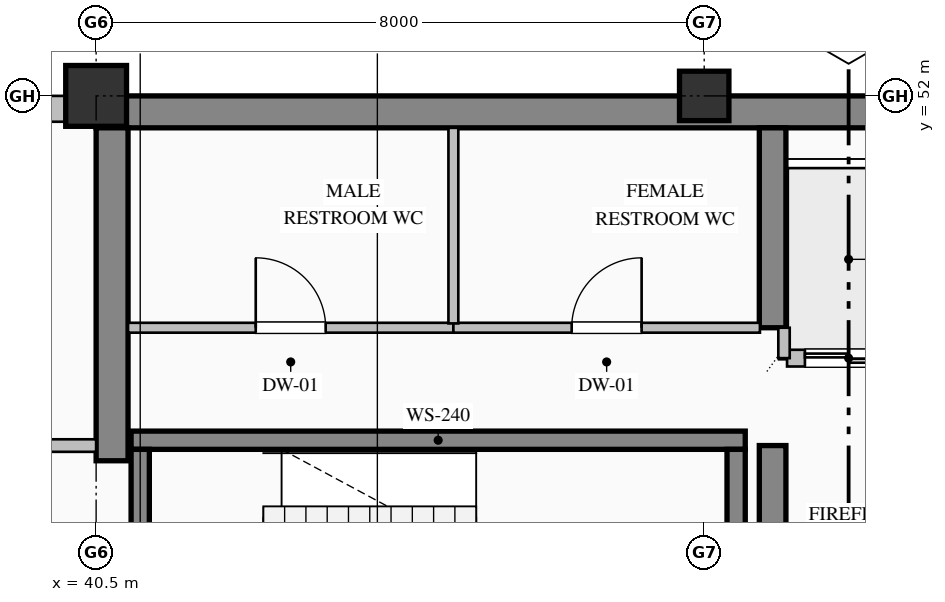
"""IFC4 building model, lengths in metres.
Left out: names, types, materials, properties, quantities, classifications, styles, units other than length and angle.
Written with IfcOpenShell. Run it as: python <this file> out.ifc"""

import sys

from ifc_helpers import new_model, si_unit, direction, frame, frame_2d, origin, origin_2d, place, context, subcontext, project, spatial, rectangle, hollow_rectangle, extrude, element, fill, save


model = new_model("IFC4")
c1 = context("Model", 3, precision=1e-05, world=origin(), true_north=direction((0.0, 1.0)))
c2 = subcontext(c1, "Body", "Model", "MODEL_VIEW")
j1 = project(units=[si_unit("LENGTHUNIT", "METRE"), si_unit("PLANEANGLEUNIT", "RADIAN")], contexts=[c1])
p1 = place(None, origin())
s1 = spatial("IfcSite", under=j1, at=p1, CompositionType="ELEMENT")
p2 = place(p1, origin())
s2 = spatial("IfcBuilding", under=s1, at=p2, CompositionType="ELEMENT")
p3 = place(p2, frame((0.0, 0.0, 347.2)))
s3 = spatial("IfcBuildingStorey", under=s2, at=p3, CompositionType="ELEMENT", Elevation=347.2)
p4 = place(p3, frame((40.5, 51.79, 0.0), z_axis=(0.0, 0.0, 1.0), x_axis=(1.0, 0.0, 0.0)))
e1 = element("IfcWall", 1, at=p4, inside=s3, PredefinedType="SHEAR", context=c2, shape_type="SweptSolid", body=[
    extrude(rectangle(XDim=23.5, YDim=0.42, at=frame_2d((11.75, 0.0))), origin(), (0.0, 0.0, 1.0), 3.785),
])
p5 = place(p3, frame((40.71, 47.2, 0.0), z_axis=(0.0, 0.0, 1.0), x_axis=(0.0, 1.0, 0.0)))
e2 = element("IfcWall", 2, at=p5, inside=s3, PredefinedType="SHEAR", context=c2, shape_type="SweptSolid", body=[
    extrude(rectangle(XDim=4.38, YDim=0.42, at=frame_2d((2.19, 0.0))), origin(), (0.0, 0.0, 1.0), 3.785),
])
p6 = place(p3, frame((49.4, 44.4, 0.0), z_axis=(0.0, 0.0, 1.0), x_axis=(0.0, 1.0, 0.0)))
e3 = element("IfcWall", 3, at=p6, inside=s3, PredefinedType="SHEAR", context=c2, shape_type="SweptSolid", body=[
    extrude(rectangle(XDim=3.0, YDim=0.35, at=frame_2d((1.5, 0.0))), origin(), (0.0, 0.0, 1.0), 3.785),
])
p7 = place(p3, frame((49.4, 48.95, 0.0), z_axis=(0.0, 0.0, 1.0), x_axis=(0.0, 1.0, 0.0)))
e4 = element("IfcWall", 4, at=p7, inside=s3, PredefinedType="SHEAR", context=c2, shape_type="SweptSolid", body=[
    extrude(rectangle(XDim=2.63, YDim=0.35, at=frame_2d((1.315, 0.0))), origin(), (0.0, 0.0, 1.0), 3.785),
])
p8 = place(p3, frame((40.5, 52.0, 0.0), z_axis=(0.0, 0.0, 1.0), x_axis=(1.0, 0.0, 0.0)))
e5 = element("IfcColumn", 5, at=p8, inside=s3, PredefinedType="COLUMN", context=c2, shape_type="SweptSolid", body=[
    extrude(hollow_rectangle(XDim=0.8, YDim=0.8, WallThickness=0.032, at=origin_2d()), origin(), (0.0, 0.0, 1.0), 4.0),
])
p9 = place(p3, frame((48.5, 52.0, 0.0), z_axis=(0.0, 0.0, 1.0), x_axis=(1.0, 0.0, 0.0)))
e6 = element("IfcColumn", 6, at=p9, inside=s3, PredefinedType="COLUMN", context=c2, shape_type="SweptSolid", body=[
    extrude(hollow_rectangle(XDim=0.65, YDim=0.65, WallThickness=0.028, at=origin_2d()), origin(), (0.0, 0.0, 1.0), 4.0),
])
p10 = place(p3, frame((20.5, 51.83, 0.0), z_axis=(0.0, 0.0, 1.0), x_axis=(1.0, 0.0, 0.0)))
e7 = element("IfcWall", 7, at=p10, inside=s3, PredefinedType="SOLIDWALL", context=c2, shape_type="SweptSolid", body=[
    extrude(rectangle(XDim=20.02, YDim=0.34, at=frame_2d((10.01, 0.0))), origin(), (0.0, 0.0, 1.0), 3.335),
])
p11 = place(p3, frame((40.96, 47.47, 0.0), z_axis=(0.0, 0.0, 1.0), x_axis=(1.0, 0.0, 0.0)))
e8 = element("IfcWall", 8, at=p11, inside=s3, PredefinedType="SOLIDWALL", context=c2, shape_type="SweptSolid", body=[
    extrude(rectangle(XDim=8.08, YDim=0.24, at=frame_2d((4.04, 0.0))), origin(), (0.0, 0.0, 1.0), 4.0),
])
p12 = place(p3, frame((41.08, 47.35, 0.0), z_axis=(0.0, 0.0, 1.0), x_axis=(0.0, -1.0, 0.0)))
e9 = element("IfcWall", 9, at=p12, inside=s3, PredefinedType="SOLIDWALL", context=c2, shape_type="SweptSolid", body=[
    extrude(rectangle(XDim=3.15, YDim=0.24, at=frame_2d((1.575, 0.0))), origin(), (0.0, 0.0, 1.0), 4.0),
])
p13 = place(p12, frame((1.0, 0.0, 0.0)))
e10 = element("IfcOpeningElement", 10, at=p13, cuts=e9, PredefinedType="OPENING", context=c2, shape_type="SweptSolid", body=[
    extrude(rectangle(XDim=1.15, YDim=2.2, at=frame_2d((0.575, 1.1))), frame((0.0, 0.13, 0.0), z_axis=(0.0, -1.0, 0.0), x_axis=(1.0, 0.0, 0.0)), (0.0, 0.0, 1.0), 0.26),
])
p14 = place(p3, frame((48.92, 44.2, 0.0), z_axis=(0.0, 0.0, 1.0), x_axis=(0.0, 1.0, 0.0)))
e11 = element("IfcWall", 11, at=p14, inside=s3, PredefinedType="SOLIDWALL", context=c2, shape_type="SweptSolid", body=[
    extrude(rectangle(XDim=3.15, YDim=0.24, at=frame_2d((1.575, 0.0))), origin(), (0.0, 0.0, 1.0), 4.0),
])
p15 = place(p3, frame((54.71, 48.55, 0.0), z_axis=(0.0, 0.0, 1.0), x_axis=(-1.0, 0.0, 0.0)))
e12 = element("IfcWall", 12, at=p15, inside=s3, PredefinedType="PARTITIONING", context=c2, shape_type="SweptSolid", body=[
    extrude(rectangle(XDim=5.12, YDim=0.22, at=frame_2d((2.56, 0.0))), origin(), (0.0, 0.0, 1.0), 3.785),
])
p16 = place(p15, frame((3.735, 0.0, 0.0)))
e13 = element("IfcOpeningElement", 13, at=p16, cuts=e12, PredefinedType="OPENING", context=c2, shape_type="SweptSolid", body=[
    extrude(rectangle(XDim=1.15, YDim=2.2, at=frame_2d((0.575, 1.1))), frame((0.0, 0.12, 0.0), z_axis=(0.0, -1.0, 0.0), x_axis=(1.0, 0.0, 0.0)), (0.0, 0.0, 1.0), 0.24),
])
p17 = place(p15, frame((0.935, 0.0, 0.0)))
e14 = element("IfcOpeningElement", 14, at=p17, cuts=e12, PredefinedType="OPENING", context=c2, shape_type="SweptSolid", body=[
    extrude(rectangle(XDim=1.15, YDim=2.2, at=frame_2d((0.575, 1.1))), frame((0.0, 0.12, 0.0), z_axis=(0.0, -1.0, 0.0), x_axis=(1.0, 0.0, 0.0)), (0.0, 0.0, 1.0), 0.24),
])
p18 = place(p3, frame((49.55, 48.55, 0.0), z_axis=(0.0, 0.0, 1.0), x_axis=(0.0, 1.0, 0.0)))
e15 = element("IfcWall", 15, at=p18, inside=s3, PredefinedType="PARTITIONING", context=c2, shape_type="SweptSolid", body=[
    extrude(rectangle(XDim=0.4, YDim=0.15, at=frame_2d((0.2, 0.0))), origin(), (0.0, 0.0, 1.0), 3.785),
])
p19 = place(p3, frame((37.8, 47.4, 0.0), z_axis=(0.0, 0.0, 1.0), x_axis=(1.0, 0.0, 0.0)))
e16 = element("IfcWall", 16, at=p19, inside=s3, PredefinedType="PARTITIONING", context=c2, shape_type="SweptSolid", body=[
    extrude(rectangle(XDim=2.7, YDim=0.165, at=frame_2d((1.35, 0.0))), origin(), (0.0, 0.0, 1.0), 3.785),
])
p20 = place(p19, frame((0.825, 0.0, 0.0)))
e17 = element("IfcOpeningElement", 17, at=p20, cuts=e16, PredefinedType="OPENING", context=c2, shape_type="SweptSolid", body=[
    extrude(rectangle(XDim=1.05, YDim=2.15, at=frame_2d((0.525, 1.075))), frame((0.0, 0.093, 0.0), z_axis=(0.0, -1.0, 0.0), x_axis=(1.0, 0.0, 0.0)), (0.0, 0.0, 1.0), 0.185),
])
p21 = place(p3, frame((40.92, 48.95, 0.0), z_axis=(0.0, 0.0, 1.0), x_axis=(1.0, 0.0, 0.0)))
e18 = element("IfcWall", 18, at=p21, inside=s3, PredefinedType="PARTITIONING", context=c2, shape_type="SweptSolid", body=[
    extrude(rectangle(XDim=4.28, YDim=0.13, at=frame_2d((2.14, 0.0))), origin(), (0.0, 0.0, 1.0), 3.785),
])
p22 = place(p21, frame((1.68, 0.0, 0.0)))
e19 = element("IfcOpeningElement", 19, at=p22, cuts=e18, PredefinedType="OPENING", context=c2, shape_type="SweptSolid", body=[
    extrude(rectangle(XDim=0.92, YDim=2.15, at=frame_2d((0.46, 1.075))), frame((0.0, 0.075, 0.0), z_axis=(0.0, -1.0, 0.0), x_axis=(1.0, 0.0, 0.0)), (0.0, 0.0, 1.0), 0.15),
])
p23 = place(p3, frame((45.2, 48.95, 0.0), z_axis=(0.0, 0.0, 1.0), x_axis=(1.0, 0.0, 0.0)))
e20 = element("IfcWall", 20, at=p23, inside=s3, PredefinedType="PARTITIONING", context=c2, shape_type="SweptSolid", body=[
    extrude(rectangle(XDim=4.033, YDim=0.13, at=frame_2d((2.017, 0.0))), origin(), (0.0, 0.0, 1.0), 3.785),
])
p24 = place(p23, frame((1.556, 0.0, 0.0)))
e21 = element("IfcOpeningElement", 21, at=p24, cuts=e20, PredefinedType="OPENING", context=c2, shape_type="SweptSolid", body=[
    extrude(rectangle(XDim=0.92, YDim=2.15, at=frame_2d((0.46, 1.075))), frame((0.0, 0.075, 0.0), z_axis=(0.0, -1.0, 0.0), x_axis=(1.0, 0.0, 0.0)), (0.0, 0.0, 1.0), 0.15),
])
p25 = place(p3, frame((45.2, 51.58, 0.0), z_axis=(0.0, 0.0, 1.0), x_axis=(0.0, -1.0, 0.0)))
e22 = element("IfcWall", 22, at=p25, inside=s3, PredefinedType="PARTITIONING", context=c2, shape_type="SweptSolid", body=[
    extrude(rectangle(XDim=2.573, YDim=0.13, at=frame_2d((1.287, 0.0))), origin(), (0.0, 0.0, 1.0), 3.785),
])
p26 = place(p16, origin())
e23 = element("IfcDoor", 23, at=p26, inside=s3, OperationType="DOUBLE_DOOR_SLIDING", PredefinedType="DOOR", context=c2, shape_type="SweptSolid", body=[
    extrude(rectangle(XDim=1.15, YDim=2.2, at=frame_2d((0.575, 1.1))), frame((0.0, 0.025, 0.0), z_axis=(0.0, -1.0, 0.0), x_axis=(1.0, 0.0, 0.0)), (0.0, 0.0, 1.0), 0.05),
])
fill(e13, e23)
p27 = place(p22, origin())
e24 = element("IfcDoor", 24, at=p27, inside=s3, OperationType="SINGLE_SWING_LEFT", PredefinedType="DOOR", context=c2, shape_type="SweptSolid", body=[
    extrude(rectangle(XDim=0.92, YDim=2.15, at=frame_2d((0.46, 1.075))), frame((0.0, 0.025, 0.0), z_axis=(0.0, -1.0, 0.0), x_axis=(1.0, 0.0, 0.0)), (0.0, 0.0, 1.0), 0.05),
])
fill(e19, e24)
p28 = place(p24, origin())
e25 = element("IfcDoor", 25, at=p28, inside=s3, OperationType="SINGLE_SWING_RIGHT", PredefinedType="DOOR", context=c2, shape_type="SweptSolid", body=[
    extrude(rectangle(XDim=0.92, YDim=2.15, at=frame_2d((0.46, 1.075))), frame((0.0, 0.025, 0.0), z_axis=(0.0, -1.0, 0.0), x_axis=(1.0, 0.0, 0.0)), (0.0, 0.0, 1.0), 0.05),
])
fill(e21, e25)
save(model, sys.argv[1])
